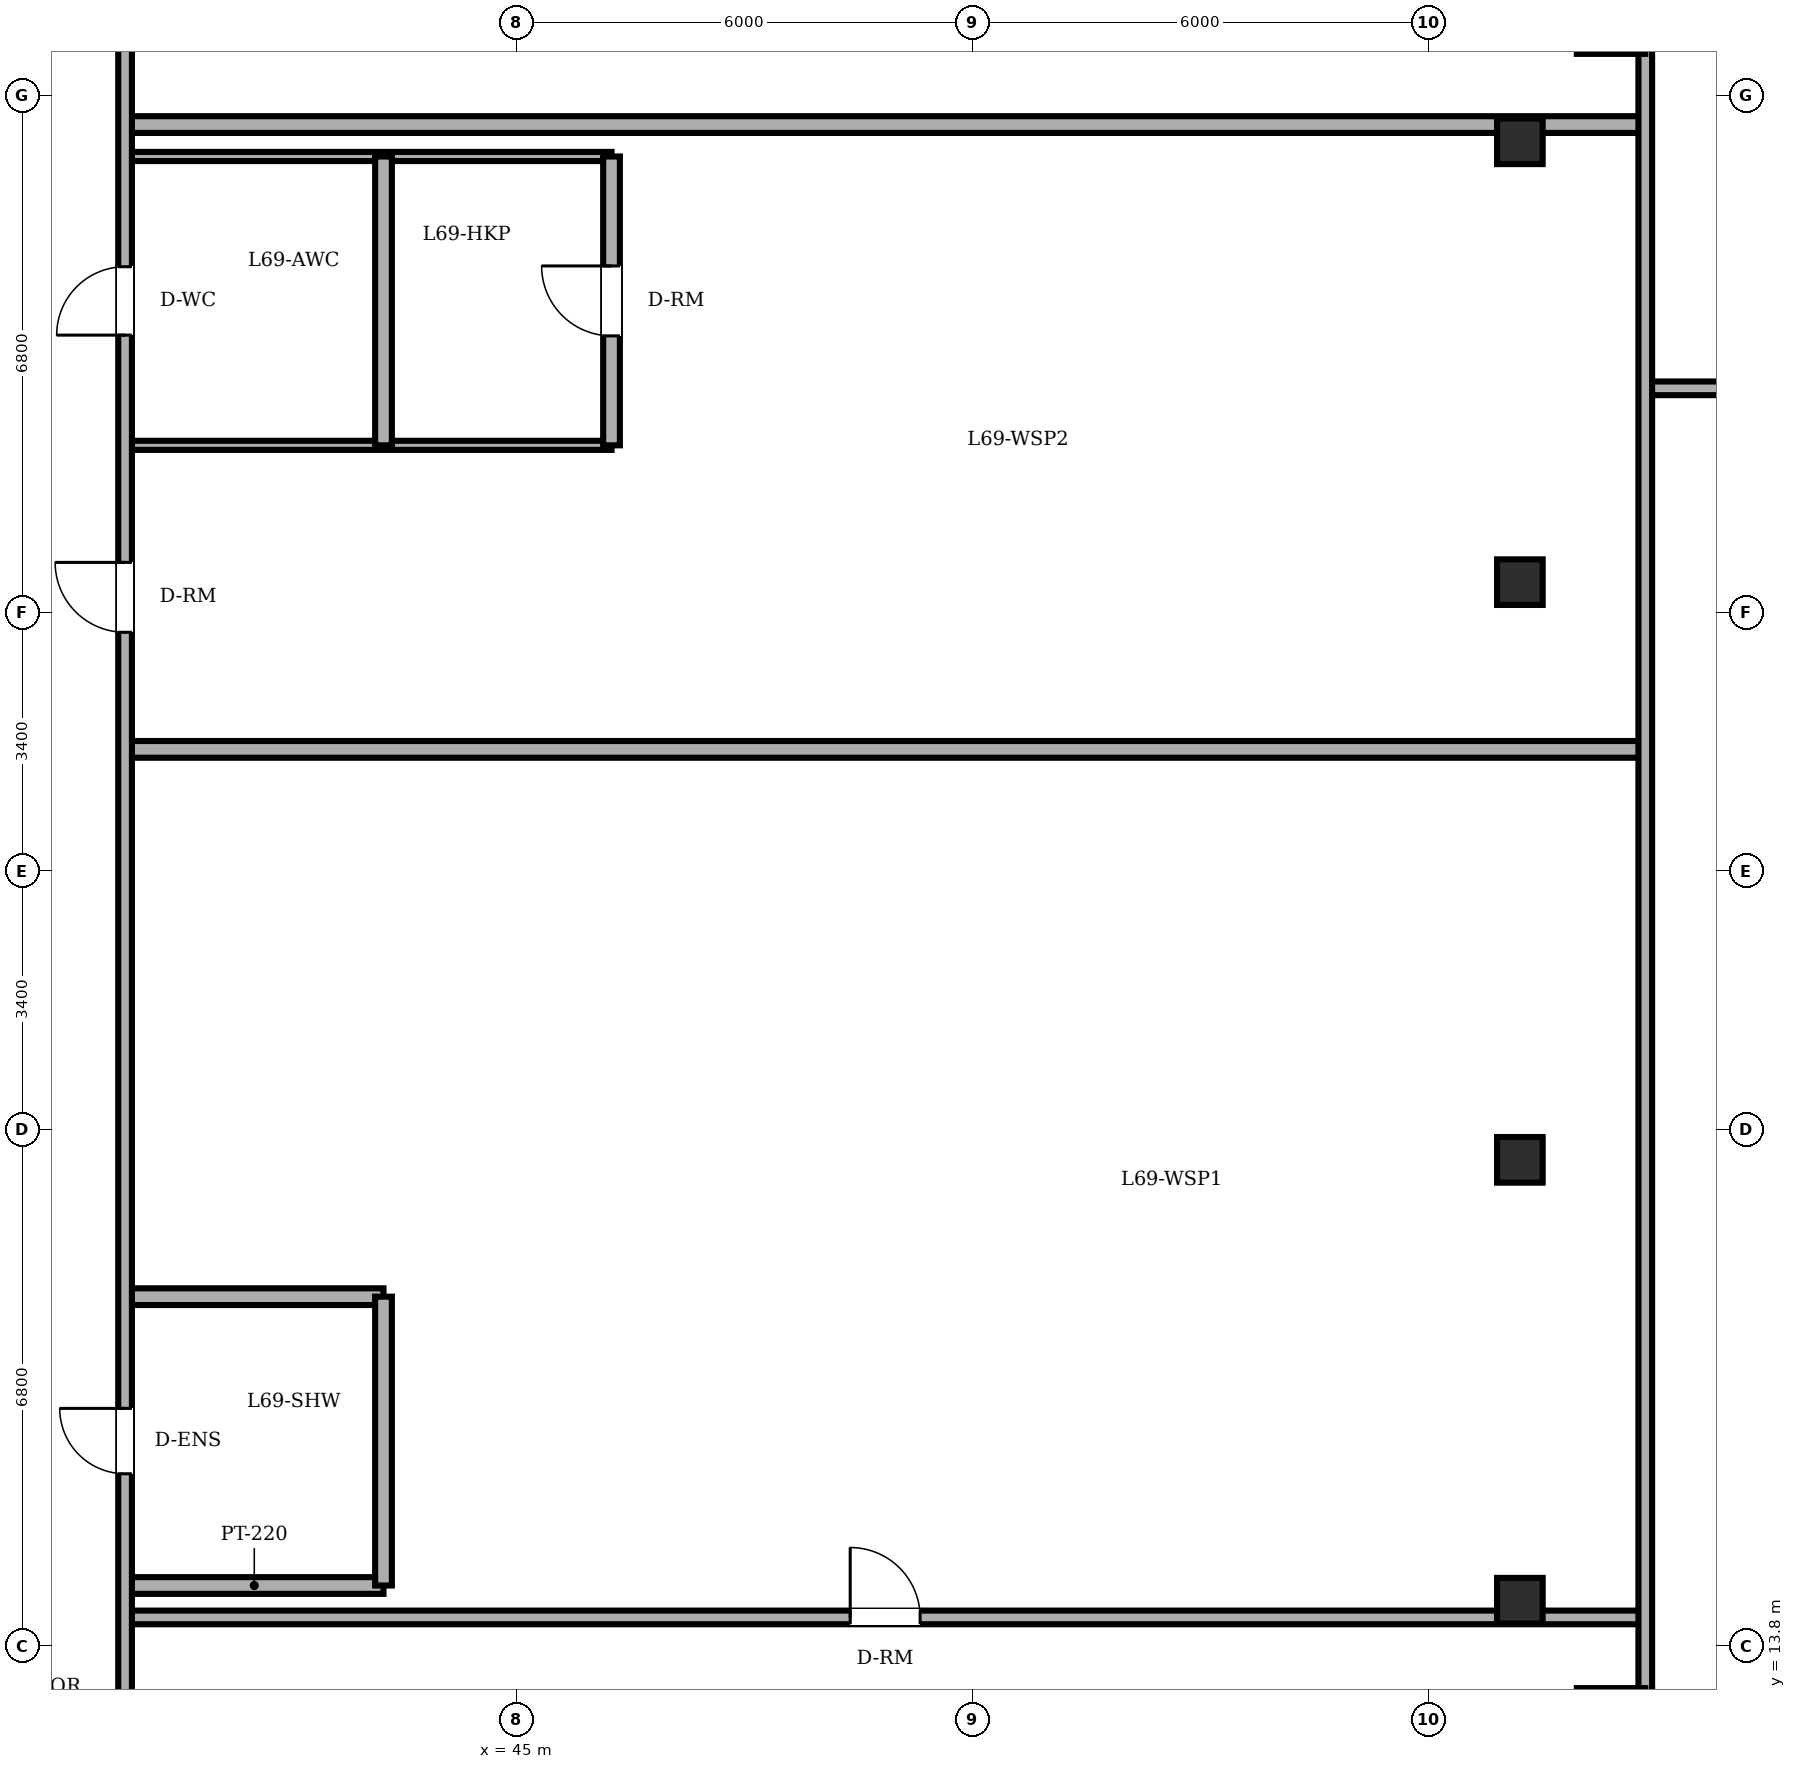
"""IFC4 building model, lengths in metres.
Left out: names, types, materials, properties, quantities, classifications, styles, units other than length and angle.
Written with IfcOpenShell. Run it as: python <this file> out.ifc"""

import sys

from ifc_helpers import new_model, si_unit, direction, frame, frame_2d, origin, origin_2d, place, context, subcontext, project, spatial, rectangle, circle, extrude, element, fill, save


model = new_model("IFC4")
c1 = context("Model", 3, precision=1e-05, world=origin(), true_north=direction((0.0, 1.0)))
c2 = subcontext(c1, "Body", "Model", "MODEL_VIEW")
j1 = project(units=[si_unit("LENGTHUNIT", "METRE"), si_unit("PLANEANGLEUNIT", "RADIAN")], contexts=[c1])
p1 = place(None, origin())
s1 = spatial("IfcSite", under=j1, at=p1, CompositionType="ELEMENT")
p2 = place(p1, origin())
s2 = spatial("IfcBuilding", under=s1, at=p2, CompositionType="ELEMENT")
p3 = place(p2, frame((0.0, 0.0, 266.1)))
s3 = spatial("IfcBuildingStorey", under=s2, at=p3, CompositionType="ELEMENT", Elevation=266.1)
for number, where, z_axis, x_axis in (
    (1, (59.4, 12.8, 0.0), (0.0, 0.0, 1.0), (1.0, 0.0, 0.0)),
    (2, (59.4, 35.2, 0.0), (0.0, 0.0, 1.0), (1.0, 0.0, 0.0)),
):
    element("IfcColumn", number, at=place(p3, frame(where, z_axis=z_axis, x_axis=x_axis)), inside=s3, PredefinedType="COLUMN", context=c2, shape_type="SweptSolid", body=[
        extrude(circle(Radius=0.45, at=origin_2d()), origin(), (0.0, 0.0, 1.0), 3.65),
    ])
for number, where, z_axis, x_axis in (
    (3, (58.2, 14.4, 0.0), (0.0, 0.0, 1.0), (1.0, 0.0, 0.0)),
    (4, (58.2, 20.2, 0.0), (0.0, 0.0, 1.0), (1.0, 0.0, 0.0)),
    (5, (58.2, 27.8, 0.0), (0.0, 0.0, 1.0), (1.0, 0.0, 0.0)),
    (6, (58.2, 33.6, 0.0), (0.0, 0.0, 1.0), (1.0, 0.0, 0.0)),
):
    element("IfcColumn", number, at=place(p3, frame(where, z_axis=z_axis, x_axis=x_axis)), inside=s3, PredefinedType="COLUMN", context=c2, shape_type="SweptSolid", body=[
        extrude(rectangle(XDim=0.6, YDim=0.6, at=origin_2d()), origin(), (0.0, 0.0, 1.0), 3.65),
    ])
p4 = place(p3, frame((39.85, 14.18, 0.0), z_axis=(0.0, 0.0, 1.0), x_axis=(1.0, 0.0, 0.0)))
e7 = element("IfcWall", 7, at=p4, inside=s3, PredefinedType="PARTITIONING", context=c2, shape_type="SweptSolid", body=[
    extrude(rectangle(XDim=20.0, YDim=0.18, at=frame_2d((10.0, 0.0))), origin(), (0.0, 0.0, 1.0), 3.092),
])
p5 = place(p4, frame((9.54, 0.0, 0.0)))
e8 = element("IfcOpeningElement", 8, at=p5, cuts=e7, PredefinedType="OPENING", context=c2, shape_type="SweptSolid", body=[
    extrude(rectangle(XDim=0.92, YDim=2.1, at=frame_2d((0.46, 1.05))), frame((0.0, 0.1, 0.0), z_axis=(0.0, -1.0, 0.0), x_axis=(1.0, 0.0, 0.0)), (0.0, 0.0, 1.0), 0.2),
])
p6 = place(p3, frame((39.85, 14.6, 0.0), z_axis=(0.0, 0.0, 1.0), x_axis=(1.0, 0.0, 0.0)))
e9 = element("IfcWall", 9, at=p6, inside=s3, PredefinedType="PARTITIONING", context=c2, shape_type="SweptSolid", body=[
    extrude(rectangle(XDim=3.4, YDim=0.22, at=frame_2d((1.7, 0.0))), origin(), (0.0, 0.0, 1.0), 3.092),
])
p7 = place(p3, frame((39.85, 18.4, 0.0), z_axis=(0.0, 0.0, 1.0), x_axis=(1.0, 0.0, 0.0)))
e10 = element("IfcWall", 10, at=p7, inside=s3, PredefinedType="PARTITIONING", context=c2, shape_type="SweptSolid", body=[
    extrude(rectangle(XDim=3.4, YDim=0.22, at=frame_2d((1.7, 0.0))), origin(), (0.0, 0.0, 1.0), 3.45),
])
p8 = place(p3, frame((39.85, 25.6, 0.0), z_axis=(0.0, 0.0, 1.0), x_axis=(1.0, 0.0, 0.0)))
e11 = element("IfcWall", 11, at=p8, inside=s3, PredefinedType="PARTITIONING", context=c2, shape_type="SweptSolid", body=[
    extrude(rectangle(XDim=20.0, YDim=0.22, at=frame_2d((10.0, 0.0))), origin(), (0.0, 0.0, 1.0), 3.45),
])
p9 = place(p3, frame((39.85, 29.6, 0.0), z_axis=(0.0, 0.0, 1.0), x_axis=(1.0, 0.0, 0.0)))
e12 = element("IfcWall", 12, at=p9, inside=s3, PredefinedType="PARTITIONING", context=c2, shape_type="SweptSolid", body=[
    extrude(rectangle(XDim=6.4, YDim=0.12, at=frame_2d((3.2, 0.0))), origin(), (0.0, 0.0, 1.0), 3.45),
])
p10 = place(p3, frame((59.85, 30.35, 0.0), z_axis=(0.0, 0.0, 1.0), x_axis=(1.0, 0.0, 0.0)))
e13 = element("IfcWall", 13, at=p10, inside=s3, PredefinedType="PARTITIONING", context=c2, shape_type="SweptSolid", body=[
    extrude(rectangle(XDim=15.139, YDim=0.18, at=frame_2d((7.569, 0.0))), origin(), (0.0, 0.0, 1.0), 3.45),
])
p11 = place(p10, frame((0.975, 0.0, 0.0)))
e14 = element("IfcOpeningElement", 14, at=p11, cuts=e13, PredefinedType="OPENING", context=c2, shape_type="SweptSolid", body=[
    extrude(rectangle(XDim=0.92, YDim=2.1, at=frame_2d((0.46, 1.05))), frame((0.0, 0.1, 0.0), z_axis=(0.0, -1.0, 0.0), x_axis=(1.0, 0.0, 0.0)), (0.0, 0.0, 1.0), 0.2),
])
p12 = place(p3, frame((39.85, 33.4, 0.0), z_axis=(0.0, 0.0, 1.0), x_axis=(1.0, 0.0, 0.0)))
e15 = element("IfcWall", 15, at=p12, inside=s3, PredefinedType="PARTITIONING", context=c2, shape_type="SweptSolid", body=[
    extrude(rectangle(XDim=6.4, YDim=0.12, at=frame_2d((3.2, 0.0))), origin(), (0.0, 0.0, 1.0), 3.092),
])
p13 = place(p3, frame((39.85, 33.82, 0.0), z_axis=(0.0, 0.0, 1.0), x_axis=(1.0, 0.0, 0.0)))
e16 = element("IfcWall", 16, at=p13, inside=s3, PredefinedType="PARTITIONING", context=c2, shape_type="SweptSolid", body=[
    extrude(rectangle(XDim=20.0, YDim=0.22, at=frame_2d((10.0, 0.0))), origin(), (0.0, 0.0, 1.0), 3.092),
])
p14 = place(p3, frame((39.85, 10.8, 0.0), z_axis=(0.0, 0.0, 1.0), x_axis=(0.0, 1.0, 0.0)))
e17 = element("IfcWall", 17, at=p14, inside=s3, PredefinedType="PARTITIONING", context=c2, shape_type="SweptSolid", body=[
    extrude(rectangle(XDim=26.4, YDim=0.18, at=frame_2d((13.2, 0.0))), origin(), (0.0, 0.0, 1.0), 3.45),
])
p15 = place(p14, frame((20.25, 0.0, 0.0)))
e18 = element("IfcOpeningElement", 18, at=p15, cuts=e17, PredefinedType="OPENING", context=c2, shape_type="SweptSolid", body=[
    extrude(rectangle(XDim=0.9, YDim=2.1, at=frame_2d((0.45, 1.05))), frame((0.0, 0.1, 0.0), z_axis=(0.0, -1.0, 0.0), x_axis=(1.0, 0.0, 0.0)), (0.0, 0.0, 1.0), 0.2),
])
p16 = place(p14, frame((5.27, 0.0, 0.0)))
e19 = element("IfcOpeningElement", 19, at=p16, cuts=e17, PredefinedType="OPENING", context=c2, shape_type="SweptSolid", body=[
    extrude(rectangle(XDim=0.86, YDim=2.1, at=frame_2d((0.43, 1.05))), frame((0.0, 0.1, 0.0), z_axis=(0.0, -1.0, 0.0), x_axis=(1.0, 0.0, 0.0)), (0.0, 0.0, 1.0), 0.2),
])
p17 = place(p14, frame((16.34, 0.0, 0.0)))
e20 = element("IfcOpeningElement", 20, at=p17, cuts=e17, PredefinedType="OPENING", context=c2, shape_type="SweptSolid", body=[
    extrude(rectangle(XDim=0.92, YDim=2.1, at=frame_2d((0.46, 1.05))), frame((0.0, 0.1, 0.0), z_axis=(0.0, -1.0, 0.0), x_axis=(1.0, 0.0, 0.0)), (0.0, 0.0, 1.0), 0.2),
])
for number, where, z_axis, x_axis in (
    (21, (43.25, 14.6, 0.0), (0.0, 0.0, 1.0), (0.0, 1.0, 0.0)),
    (22, (43.25, 29.6, 0.0), (0.0, 0.0, 1.0), (0.0, 1.0, 0.0)),
):
    element("IfcWall", number, at=place(p3, frame(where, z_axis=z_axis, x_axis=x_axis)), inside=s3, PredefinedType="PARTITIONING", context=c2, shape_type="SweptSolid", body=[
        extrude(rectangle(XDim=3.8, YDim=0.22, at=frame_2d((1.9, 0.0))), origin(), (0.0, 0.0, 1.0), 3.45),
    ])
p18 = place(p3, frame((46.25, 29.6, 0.0), z_axis=(0.0, 0.0, 1.0), x_axis=(0.0, 1.0, 0.0)))
e23 = element("IfcWall", 23, at=p18, inside=s3, PredefinedType="PARTITIONING", context=c2, shape_type="SweptSolid", body=[
    extrude(rectangle(XDim=3.8, YDim=0.22, at=frame_2d((1.9, 0.0))), origin(), (0.0, 0.0, 1.0), 3.45),
])
p19 = place(p18, frame((1.44, 0.0, 0.0)))
e24 = element("IfcOpeningElement", 24, at=p19, cuts=e23, PredefinedType="OPENING", context=c2, shape_type="SweptSolid", body=[
    extrude(rectangle(XDim=0.92, YDim=2.1, at=frame_2d((0.46, 1.05))), frame((0.0, 0.12, 0.0), z_axis=(0.0, -1.0, 0.0), x_axis=(1.0, 0.0, 0.0)), (0.0, 0.0, 1.0), 0.24),
])
p20 = place(p3, frame((59.85, 10.8, 0.0), z_axis=(0.0, 0.0, 1.0), x_axis=(0.0, 1.0, 0.0)))
e25 = element("IfcWall", 25, at=p20, inside=s3, PredefinedType="PARTITIONING", context=c2, shape_type="SweptSolid", body=[
    extrude(rectangle(XDim=26.4, YDim=0.18, at=frame_2d((13.2, 0.0))), origin(), (0.0, 0.0, 1.0), 3.45),
])
p21 = place(p15, origin())
e26 = element("IfcDoor", 26, at=p21, inside=s3, OperationType="SINGLE_SWING_LEFT", PredefinedType="DOOR", context=c2, shape_type="SweptSolid", body=[
    extrude(rectangle(XDim=0.9, YDim=2.1, at=frame_2d((0.45, 1.05))), frame((0.0, 0.025, 0.0), z_axis=(0.0, -1.0, 0.0), x_axis=(1.0, 0.0, 0.0)), (0.0, 0.0, 1.0), 0.05),
])
fill(e18, e26)
p22 = place(p16, origin())
e27 = element("IfcDoor", 27, at=p22, inside=s3, OperationType="SINGLE_SWING_RIGHT", PredefinedType="DOOR", context=c2, shape_type="SweptSolid", body=[
    extrude(rectangle(XDim=0.86, YDim=2.1, at=frame_2d((0.43, 1.05))), frame((0.0, 0.025, 0.0), z_axis=(0.0, -1.0, 0.0), x_axis=(1.0, 0.0, 0.0)), (0.0, 0.0, 1.0), 0.05),
])
fill(e19, e27)
p23 = place(p5, origin())
e28 = element("IfcDoor", 28, at=p23, inside=s3, OperationType="SINGLE_SWING_LEFT", PredefinedType="DOOR", context=c2, shape_type="SweptSolid", body=[
    extrude(rectangle(XDim=0.92, YDim=2.1, at=frame_2d((0.46, 1.05))), frame((0.0, 0.025, 0.0), z_axis=(0.0, -1.0, 0.0), x_axis=(1.0, 0.0, 0.0)), (0.0, 0.0, 1.0), 0.05),
])
fill(e8, e28)
p24 = place(p17, origin())
e29 = element("IfcDoor", 29, at=p24, inside=s3, OperationType="SINGLE_SWING_RIGHT", PredefinedType="DOOR", context=c2, shape_type="SweptSolid", body=[
    extrude(rectangle(XDim=0.92, YDim=2.1, at=frame_2d((0.46, 1.05))), frame((0.0, 0.025, 0.0), z_axis=(0.0, -1.0, 0.0), x_axis=(1.0, 0.0, 0.0)), (0.0, 0.0, 1.0), 0.05),
])
fill(e20, e29)
p25 = place(p19, origin())
e30 = element("IfcDoor", 30, at=p25, inside=s3, OperationType="SINGLE_SWING_RIGHT", PredefinedType="DOOR", context=c2, shape_type="SweptSolid", body=[
    extrude(rectangle(XDim=0.92, YDim=2.1, at=frame_2d((0.46, 1.05))), frame((0.0, 0.025, 0.0), z_axis=(0.0, -1.0, 0.0), x_axis=(1.0, 0.0, 0.0)), (0.0, 0.0, 1.0), 0.05),
])
fill(e24, e30)
save(model, sys.argv[1])
